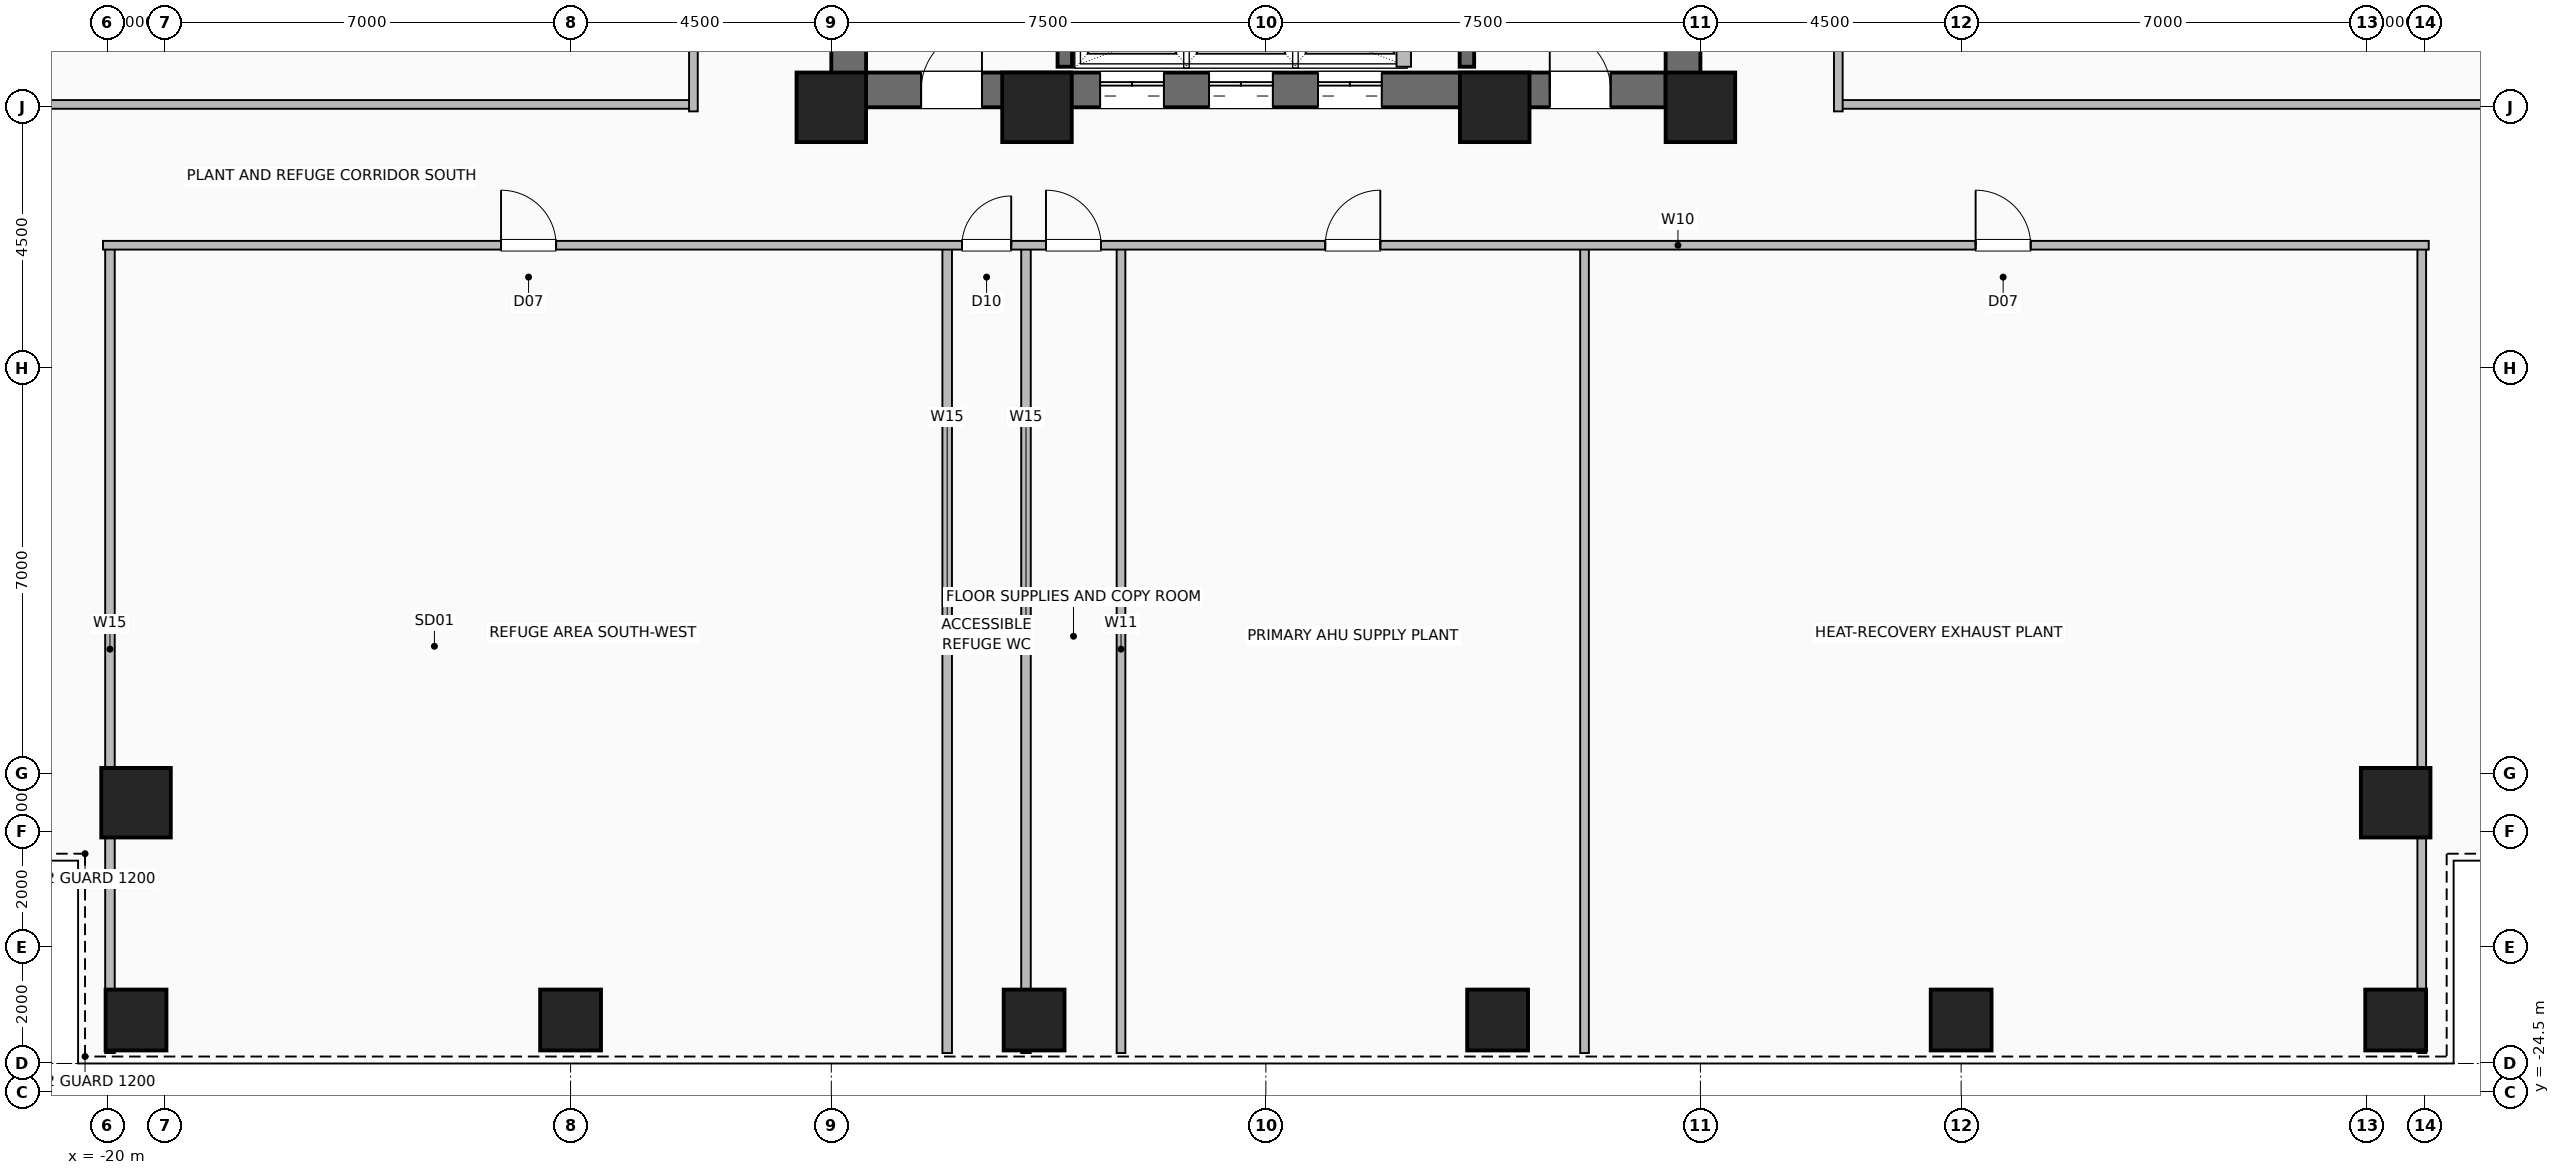
"""IFC4 building model, lengths in metres.
Left out: names, types, materials, properties, quantities, classifications, styles, units other than length and angle.
Written with IfcOpenShell. Run it as: python <this file> out.ifc"""

import sys

from ifc_helpers import new_model, si_unit, direction, frame, frame_2d, origin, origin_2d, place, context, subcontext, project, spatial, rectangle, hollow_rectangle, extrude, element, fill, save


model = new_model("IFC4")
c1 = context("Model", 3, precision=1e-05, world=origin(), true_north=direction((0.0, 1.0)))
c2 = subcontext(c1, "Body", "Model", "MODEL_VIEW")
j1 = project(units=[si_unit("LENGTHUNIT", "METRE"), si_unit("PLANEANGLEUNIT", "RADIAN")], contexts=[c1])
p1 = place(None, origin())
s1 = spatial("IfcSite", under=j1, at=p1, CompositionType="ELEMENT")
p2 = place(p1, origin())
s2 = spatial("IfcBuilding", under=s1, at=p2, CompositionType="ELEMENT")
p3 = place(p2, frame((0.0, 0.0, 88.0)))
s3 = spatial("IfcBuildingStorey", under=s2, at=p3, CompositionType="ELEMENT", Elevation=88.0)
for number, where, z_axis, x_axis in (
    (1, (-7.5, -7.5, 0.0), (0.0, 0.0, 1.0), (1.0, 0.0, 0.0)),
    (2, (-3.95, -7.5, 0.0), (0.0, 0.0, 1.0), (1.0, 0.0, 0.0)),
    (3, (3.95, -7.5, 0.0), (0.0, 0.0, 1.0), (1.0, 0.0, 0.0)),
    (4, (7.5, -7.5, 0.0), (0.0, 0.0, 1.0), (1.0, 0.0, 0.0)),
):
    element("IfcColumn", number, at=place(p3, frame(where, z_axis=z_axis, x_axis=x_axis)), inside=s3, PredefinedType="COLUMN", context=c2, shape_type="SweptSolid", body=[
        extrude(hollow_rectangle(XDim=1.2, YDim=1.2, WallThickness=0.055, at=origin_2d()), origin(), (0.0, 0.0, 1.0), 6.0),
    ])
for number, where, z_axis, x_axis in (
    (5, (-19.5, -23.25, 0.0), (0.0, 0.0, 1.0), (1.0, 0.0, 0.0)),
    (6, (-12.0, -23.25, 0.0), (0.0, 0.0, 1.0), (1.0, 0.0, 0.0)),
    (7, (-4.0, -23.25, 0.0), (0.0, 0.0, 1.0), (1.0, 0.0, 0.0)),
    (8, (4.0, -23.25, 0.0), (0.0, 0.0, 1.0), (1.0, 0.0, 0.0)),
    (9, (12.0, -23.25, 0.0), (0.0, 0.0, 1.0), (1.0, 0.0, 0.0)),
    (10, (19.5, -23.25, 0.0), (0.0, 0.0, 1.0), (1.0, 0.0, 0.0)),
):
    element("IfcColumn", number, at=place(p3, frame(where, z_axis=z_axis, x_axis=x_axis)), inside=s3, PredefinedType="COLUMN", context=c2, shape_type="SweptSolid", body=[
        extrude(hollow_rectangle(XDim=1.05, YDim=1.05, WallThickness=0.05, at=origin_2d()), origin(), (0.0, 0.0, 1.0), 5.6),
    ])
for number, where, z_axis, x_axis in (
    (11, (-19.5, -19.5, 0.0), (0.0, 0.0, 1.0), (1.0, 0.0, 0.0)),
    (12, (19.5, -19.5, 0.0), (0.0, 0.0, 1.0), (1.0, 0.0, 0.0)),
):
    element("IfcColumn", number, at=place(p3, frame(where, z_axis=z_axis, x_axis=x_axis)), inside=s3, PredefinedType="COLUMN", context=c2, shape_type="SweptSolid", body=[
        extrude(hollow_rectangle(XDim=1.2, YDim=1.2, WallThickness=0.055, at=origin_2d()), origin(), (0.0, 0.0, 1.0), 5.6),
    ])
p4 = place(p3, frame((-7.5, -7.2, 0.0), z_axis=(0.0, 0.0, 1.0), x_axis=(1.0, 0.0, 0.0)))
e13 = element("IfcWall", 13, at=p4, inside=s3, PredefinedType="SHEAR", context=c2, shape_type="SweptSolid", body=[
    extrude(rectangle(XDim=15.0, YDim=0.6, at=frame_2d((7.5, 0.0))), origin(), (0.0, 0.0, 1.0), 5.6),
])
p5 = place(p4, frame((1.55, 0.0, 0.0)))
e14 = element("IfcOpeningElement", 14, at=p5, cuts=e13, PredefinedType="OPENING", context=c2, shape_type="SweptSolid", body=[
    extrude(rectangle(XDim=1.05, YDim=2.08, at=frame_2d((0.525, 1.04))), frame((0.0, 0.31, 0.0), z_axis=(0.0, -1.0, 0.0), x_axis=(1.0, 0.0, 0.0)), (0.0, 0.0, 1.0), 0.62),
])
p6 = place(p4, frame((12.4, 0.0, 0.0)))
e15 = element("IfcOpeningElement", 15, at=p6, cuts=e13, PredefinedType="OPENING", context=c2, shape_type="SweptSolid", body=[
    extrude(rectangle(XDim=1.05, YDim=2.08, at=frame_2d((0.525, 1.04))), frame((0.0, 0.31, 0.0), z_axis=(0.0, -1.0, 0.0), x_axis=(1.0, 0.0, 0.0)), (0.0, 0.0, 1.0), 0.62),
])
p7 = place(p4, frame((4.64, 0.0, 0.0)))
e16 = element("IfcOpeningElement", 16, at=p7, cuts=e13, PredefinedType="OPENING", context=c2, shape_type="SweptSolid", body=[
    extrude(rectangle(XDim=1.1, YDim=2.2, at=frame_2d((0.55, 1.1))), frame((0.0, 0.31, 0.0), z_axis=(0.0, -1.0, 0.0), x_axis=(1.0, 0.0, 0.0)), (0.0, 0.0, 1.0), 0.62),
])
p8 = place(p4, frame((6.52, 0.0, 0.0)))
e17 = element("IfcOpeningElement", 17, at=p8, cuts=e13, PredefinedType="OPENING", context=c2, shape_type="SweptSolid", body=[
    extrude(rectangle(XDim=1.1, YDim=2.2, at=frame_2d((0.55, 1.1))), frame((0.0, 0.31, 0.0), z_axis=(0.0, -1.0, 0.0), x_axis=(1.0, 0.0, 0.0)), (0.0, 0.0, 1.0), 0.62),
])
p9 = place(p4, frame((8.4, 0.0, 0.0)))
e18 = element("IfcOpeningElement", 18, at=p9, cuts=e13, PredefinedType="OPENING", context=c2, shape_type="SweptSolid", body=[
    extrude(rectangle(XDim=1.1, YDim=2.2, at=frame_2d((0.55, 1.1))), frame((0.0, 0.31, 0.0), z_axis=(0.0, -1.0, 0.0), x_axis=(1.0, 0.0, 0.0)), (0.0, 0.0, 1.0), 0.62),
])
p10 = place(p3, frame((-7.2, -7.5, 0.0), z_axis=(0.0, 0.0, 1.0), x_axis=(0.0, 1.0, 0.0)))
e19 = element("IfcWall", 19, at=p10, inside=s3, PredefinedType="SHEAR", context=c2, shape_type="SweptSolid", body=[
    extrude(rectangle(XDim=15.0, YDim=0.6, at=frame_2d((7.5, 0.0))), origin(), (0.0, 0.0, 1.0), 5.6),
])
p11 = place(p10, frame((9.5, 0.0, 0.0)))
e20 = element("IfcOpeningElement", 20, at=p11, cuts=e19, PredefinedType="OPENING", context=c2, shape_type="SweptSolid", body=[
    extrude(rectangle(XDim=1.0, YDim=2.08, at=frame_2d((0.5, 1.04))), frame((0.0, 0.31, 0.0), z_axis=(0.0, -1.0, 0.0), x_axis=(1.0, 0.0, 0.0)), (0.0, 0.0, 1.0), 0.62),
])
p12 = place(p3, frame((7.2, -7.5, 0.0), z_axis=(0.0, 0.0, 1.0), x_axis=(0.0, 1.0, 0.0)))
e21 = element("IfcWall", 21, at=p12, inside=s3, PredefinedType="SHEAR", context=c2, shape_type="SweptSolid", body=[
    extrude(rectangle(XDim=15.0, YDim=0.6, at=frame_2d((7.5, 0.0))), origin(), (0.0, 0.0, 1.0), 5.6),
])
for number, where, z_axis, x_axis in (
    (22, (-3.47, -6.8, 0.0), (0.0, 0.0, 1.0), (0.0, 1.0, 0.0)),
    (23, (3.47, -6.8, 0.0), (0.0, 0.0, 1.0), (0.0, 1.0, 0.0)),
):
    element("IfcWall", number, at=place(p3, frame(where, z_axis=z_axis, x_axis=x_axis)), inside=s3, PredefinedType="SHEAR", context=c2, shape_type="SweptSolid", body=[
        extrude(rectangle(XDim=7.72, YDim=0.25, at=frame_2d((3.86, 0.0))), origin(), (0.0, 0.0, 1.0), 5.6),
    ])
p13 = place(p3, frame((2.38, -6.8, 0.0), z_axis=(0.0, 0.0, 1.0), x_axis=(0.0, 1.0, 0.0)))
e24 = element("IfcWall", 24, at=p13, inside=s3, PredefinedType="SHEAR", context=c2, shape_type="SweptSolid", body=[
    extrude(rectangle(XDim=2.22, YDim=0.25, at=frame_2d((1.11, 0.0))), origin(), (0.0, 0.0, 1.0), 5.6),
])
for number, where, z_axis, x_axis in (
    (25, (-4.14, -23.82, 0.0), (0.0, 0.0, 1.0), (0.0, 1.0, 0.0)),
    (26, (-19.95, -23.82, 0.0), (0.0, 0.0, 1.0), (0.0, 1.0, 0.0)),
    (27, (-5.5, -23.82, 0.0), (0.0, 0.0, 1.0), (0.0, 1.0, 0.0)),
):
    element("IfcWall", number, at=place(p3, frame(where, z_axis=z_axis, x_axis=x_axis)), inside=s3, PredefinedType="PLUMBINGWALL", context=c2, shape_type="SweptSolid", body=[
        extrude(rectangle(XDim=13.94, YDim=0.165, at=frame_2d((6.97, 0.0))), origin(), (0.0, 0.0, 1.0), 5.6),
    ])
for number, where, z_axis, x_axis in (
    (28, (-2.5, -23.82, 0.0), (0.0, 0.0, 1.0), (0.0, 1.0, 0.0)),
    (29, (5.5, -23.82, 0.0), (0.0, 0.0, 1.0), (0.0, 1.0, 0.0)),
    (30, (19.95, -23.82, 0.0), (0.0, 0.0, 1.0), (0.0, 1.0, 0.0)),
):
    element("IfcWall", number, at=place(p3, frame(where, z_axis=z_axis, x_axis=x_axis)), inside=s3, PredefinedType="PARTITIONING", context=c2, shape_type="SweptSolid", body=[
        extrude(rectangle(XDim=13.94, YDim=0.15, at=frame_2d((6.97, 0.0))), origin(), (0.0, 0.0, 1.0), 5.6),
    ])
p14 = place(p3, frame((-20.07, -9.88, 0.0), z_axis=(0.0, 0.0, 1.0), x_axis=(1.0, 0.0, 0.0)))
e31 = element("IfcWall", 31, at=p14, inside=s3, PredefinedType="PARTITIONING", context=c2, shape_type="SweptSolid", body=[
    extrude(rectangle(XDim=40.14, YDim=0.15, at=frame_2d((20.07, 0.0))), origin(), (0.0, 0.0, 1.0), 3.975),
])
p15 = place(p14, frame((6.87, 0.0, 0.0)))
e32 = element("IfcOpeningElement", 32, at=p15, cuts=e31, PredefinedType="OPENING", context=c2, shape_type="SweptSolid", body=[
    extrude(rectangle(XDim=0.95, YDim=2.06, at=frame_2d((0.475, 1.03))), frame((0.0, 0.085, 0.0), z_axis=(0.0, -1.0, 0.0), x_axis=(1.0, 0.0, 0.0)), (0.0, 0.0, 1.0), 0.17),
])
p16 = place(p14, frame((14.825, 0.0, 0.0)))
e33 = element("IfcOpeningElement", 33, at=p16, cuts=e31, PredefinedType="OPENING", context=c2, shape_type="SweptSolid", body=[
    extrude(rectangle(XDim=0.85, YDim=2.05, at=frame_2d((0.425, 1.025))), frame((0.0, 0.085, 0.0), z_axis=(0.0, -1.0, 0.0), x_axis=(1.0, 0.0, 0.0)), (0.0, 0.0, 1.0), 0.17),
])
p17 = place(p14, frame((16.275, 0.0, 0.0)))
e34 = element("IfcOpeningElement", 34, at=p17, cuts=e31, PredefinedType="OPENING", context=c2, shape_type="SweptSolid", body=[
    extrude(rectangle(XDim=0.95, YDim=2.06, at=frame_2d((0.475, 1.03))), frame((0.0, 0.085, 0.0), z_axis=(0.0, -1.0, 0.0), x_axis=(1.0, 0.0, 0.0)), (0.0, 0.0, 1.0), 0.17),
])
p18 = place(p14, frame((21.095, 0.0, 0.0)))
e35 = element("IfcOpeningElement", 35, at=p18, cuts=e31, PredefinedType="OPENING", context=c2, shape_type="SweptSolid", body=[
    extrude(rectangle(XDim=0.95, YDim=2.06, at=frame_2d((0.475, 1.03))), frame((0.0, 0.085, 0.0), z_axis=(0.0, -1.0, 0.0), x_axis=(1.0, 0.0, 0.0)), (0.0, 0.0, 1.0), 0.17),
])
p19 = place(p14, frame((32.32, 0.0, 0.0)))
e36 = element("IfcOpeningElement", 36, at=p19, cuts=e31, PredefinedType="OPENING", context=c2, shape_type="SweptSolid", body=[
    extrude(rectangle(XDim=0.95, YDim=2.06, at=frame_2d((0.475, 1.03))), frame((0.0, 0.085, 0.0), z_axis=(0.0, -1.0, 0.0), x_axis=(1.0, 0.0, 0.0)), (0.0, 0.0, 1.0), 0.17),
])
p20 = place(p3, frame((-23.82, -7.45, 0.0), z_axis=(0.0, 0.0, 1.0), x_axis=(1.0, 0.0, 0.0)))
e37 = element("IfcWall", 37, at=p20, inside=s3, PredefinedType="PARTITIONING", context=c2, shape_type="SweptSolid", body=[
    extrude(rectangle(XDim=13.94, YDim=0.15, at=frame_2d((6.97, 0.0))), origin(), (0.0, 0.0, 1.0), 3.975),
])
p21 = place(p3, frame((-9.88, -7.57, 0.0), z_axis=(0.0, 0.0, 1.0), x_axis=(0.0, 1.0, 0.0)))
e38 = element("IfcWall", 38, at=p21, inside=s3, PredefinedType="PARTITIONING", context=c2, shape_type="SweptSolid", body=[
    extrude(rectangle(XDim=15.14, YDim=0.15, at=frame_2d((7.57, 0.0))), origin(), (0.0, 0.0, 1.0), 5.6),
])
p22 = place(p21, frame((4.17, 0.0, 0.0)))
e39 = element("IfcOpeningElement", 39, at=p22, cuts=e38, PredefinedType="OPENING", context=c2, shape_type="SweptSolid", body=[
    extrude(rectangle(XDim=0.95, YDim=2.06, at=frame_2d((0.475, 1.03))), frame((0.0, 0.085, 0.0), z_axis=(0.0, -1.0, 0.0), x_axis=(1.0, 0.0, 0.0)), (0.0, 0.0, 1.0), 0.17),
])
p23 = place(p21, frame((11.62, 0.0, 0.0)))
e40 = element("IfcOpeningElement", 40, at=p23, cuts=e38, PredefinedType="OPENING", context=c2, shape_type="SweptSolid", body=[
    extrude(rectangle(XDim=0.95, YDim=2.06, at=frame_2d((0.475, 1.03))), frame((0.0, 0.085, 0.0), z_axis=(0.0, -1.0, 0.0), x_axis=(1.0, 0.0, 0.0)), (0.0, 0.0, 1.0), 0.17),
])
p24 = place(p3, frame((9.88, -7.45, 0.0), z_axis=(0.0, 0.0, 1.0), x_axis=(1.0, 0.0, 0.0)))
e41 = element("IfcWall", 41, at=p24, inside=s3, PredefinedType="PARTITIONING", context=c2, shape_type="SweptSolid", body=[
    extrude(rectangle(XDim=13.94, YDim=0.15, at=frame_2d((6.97, 0.0))), origin(), (0.0, 0.0, 1.0), 3.975),
])
p25 = place(p3, frame((9.88, -7.57, 0.0), z_axis=(0.0, 0.0, 1.0), x_axis=(0.0, 1.0, 0.0)))
e42 = element("IfcWall", 42, at=p25, inside=s3, PredefinedType="PARTITIONING", context=c2, shape_type="SweptSolid", body=[
    extrude(rectangle(XDim=15.14, YDim=0.15, at=frame_2d((7.57, 0.0))), origin(), (0.0, 0.0, 1.0), 5.6),
])
p26 = place(p25, frame((4.17, 0.0, 0.0)))
e43 = element("IfcOpeningElement", 43, at=p26, cuts=e42, PredefinedType="OPENING", context=c2, shape_type="SweptSolid", body=[
    extrude(rectangle(XDim=0.95, YDim=2.06, at=frame_2d((0.475, 1.03))), frame((0.0, 0.085, 0.0), z_axis=(0.0, -1.0, 0.0), x_axis=(1.0, 0.0, 0.0)), (0.0, 0.0, 1.0), 0.17),
])
p27 = place(p25, frame((11.62, 0.0, 0.0)))
e44 = element("IfcOpeningElement", 44, at=p27, cuts=e42, PredefinedType="OPENING", context=c2, shape_type="SweptSolid", body=[
    extrude(rectangle(XDim=0.95, YDim=2.06, at=frame_2d((0.475, 1.03))), frame((0.0, 0.085, 0.0), z_axis=(0.0, -1.0, 0.0), x_axis=(1.0, 0.0, 0.0)), (0.0, 0.0, 1.0), 0.17),
])
p28 = place(p5, origin())
e45 = element("IfcDoor", 45, at=p28, inside=s3, OperationType="SINGLE_SWING_RIGHT", PredefinedType="DOOR", context=c2, shape_type="SweptSolid", body=[
    extrude(rectangle(XDim=1.05, YDim=2.08, at=frame_2d((0.525, 1.04))), frame((0.0, 0.025, 0.0), z_axis=(0.0, -1.0, 0.0), x_axis=(1.0, 0.0, 0.0)), (0.0, 0.0, 1.0), 0.05),
])
fill(e14, e45)
p29 = place(p6, origin())
e46 = element("IfcDoor", 46, at=p29, inside=s3, OperationType="SINGLE_SWING_LEFT", PredefinedType="DOOR", context=c2, shape_type="SweptSolid", body=[
    extrude(rectangle(XDim=1.05, YDim=2.08, at=frame_2d((0.525, 1.04))), frame((0.0, 0.025, 0.0), z_axis=(0.0, -1.0, 0.0), x_axis=(1.0, 0.0, 0.0)), (0.0, 0.0, 1.0), 0.05),
])
fill(e15, e46)
p30 = place(p7, origin())
e47 = element("IfcDoor", 47, at=p30, inside=s3, OperationType="DOUBLE_DOOR_SLIDING", PredefinedType="DOOR", context=c2, shape_type="SweptSolid", body=[
    extrude(rectangle(XDim=1.1, YDim=2.2, at=frame_2d((0.55, 1.1))), frame((0.0, 0.025, 0.0), z_axis=(0.0, -1.0, 0.0), x_axis=(1.0, 0.0, 0.0)), (0.0, 0.0, 1.0), 0.05),
])
fill(e16, e47)
p31 = place(p8, origin())
e48 = element("IfcDoor", 48, at=p31, inside=s3, OperationType="DOUBLE_DOOR_SLIDING", PredefinedType="DOOR", context=c2, shape_type="SweptSolid", body=[
    extrude(rectangle(XDim=1.1, YDim=2.2, at=frame_2d((0.55, 1.1))), frame((0.0, 0.025, 0.0), z_axis=(0.0, -1.0, 0.0), x_axis=(1.0, 0.0, 0.0)), (0.0, 0.0, 1.0), 0.05),
])
fill(e17, e48)
p32 = place(p9, origin())
e49 = element("IfcDoor", 49, at=p32, inside=s3, OperationType="DOUBLE_DOOR_SLIDING", PredefinedType="DOOR", context=c2, shape_type="SweptSolid", body=[
    extrude(rectangle(XDim=1.1, YDim=2.2, at=frame_2d((0.55, 1.1))), frame((0.0, 0.025, 0.0), z_axis=(0.0, -1.0, 0.0), x_axis=(1.0, 0.0, 0.0)), (0.0, 0.0, 1.0), 0.05),
])
fill(e18, e49)
p33 = place(p15, origin())
e50 = element("IfcDoor", 50, at=p33, inside=s3, OperationType="SINGLE_SWING_LEFT", PredefinedType="DOOR", context=c2, shape_type="SweptSolid", body=[
    extrude(rectangle(XDim=0.95, YDim=2.06, at=frame_2d((0.475, 1.03))), frame((0.0, 0.025, 0.0), z_axis=(0.0, -1.0, 0.0), x_axis=(1.0, 0.0, 0.0)), (0.0, 0.0, 1.0), 0.05),
])
fill(e32, e50)
p34 = place(p16, origin())
e51 = element("IfcDoor", 51, at=p34, inside=s3, OperationType="SINGLE_SWING_RIGHT", PredefinedType="DOOR", context=c2, shape_type="SweptSolid", body=[
    extrude(rectangle(XDim=0.85, YDim=2.05, at=frame_2d((0.425, 1.025))), frame((0.0, 0.025, 0.0), z_axis=(0.0, -1.0, 0.0), x_axis=(1.0, 0.0, 0.0)), (0.0, 0.0, 1.0), 0.05),
])
fill(e33, e51)
p35 = place(p17, origin())
e52 = element("IfcDoor", 52, at=p35, inside=s3, OperationType="SINGLE_SWING_LEFT", PredefinedType="DOOR", context=c2, shape_type="SweptSolid", body=[
    extrude(rectangle(XDim=0.95, YDim=2.06, at=frame_2d((0.475, 1.03))), frame((0.0, 0.025, 0.0), z_axis=(0.0, -1.0, 0.0), x_axis=(1.0, 0.0, 0.0)), (0.0, 0.0, 1.0), 0.05),
])
fill(e34, e52)
p36 = place(p18, origin())
e53 = element("IfcDoor", 53, at=p36, inside=s3, OperationType="SINGLE_SWING_RIGHT", PredefinedType="DOOR", context=c2, shape_type="SweptSolid", body=[
    extrude(rectangle(XDim=0.95, YDim=2.06, at=frame_2d((0.475, 1.03))), frame((0.0, 0.025, 0.0), z_axis=(0.0, -1.0, 0.0), x_axis=(1.0, 0.0, 0.0)), (0.0, 0.0, 1.0), 0.05),
])
fill(e35, e53)
p37 = place(p19, origin())
e54 = element("IfcDoor", 54, at=p37, inside=s3, OperationType="SINGLE_SWING_LEFT", PredefinedType="DOOR", context=c2, shape_type="SweptSolid", body=[
    extrude(rectangle(XDim=0.95, YDim=2.06, at=frame_2d((0.475, 1.03))), frame((0.0, 0.025, 0.0), z_axis=(0.0, -1.0, 0.0), x_axis=(1.0, 0.0, 0.0)), (0.0, 0.0, 1.0), 0.05),
])
fill(e36, e54)
save(model, sys.argv[1])
